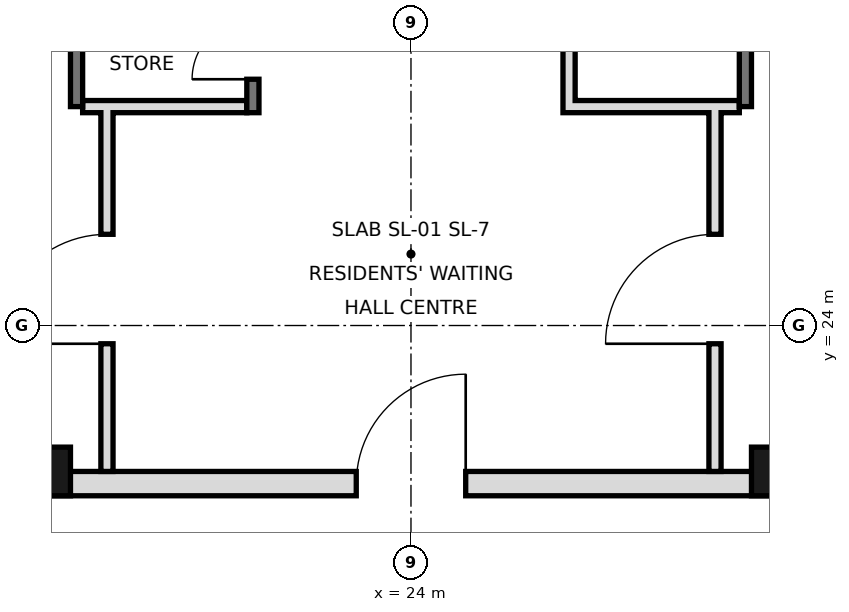
"""IFC4 building model, lengths in metres.
Left out: names, types, materials, properties, quantities, classifications, styles, units other than length and angle.
Written with IfcOpenShell. Run it as: python <this file> out.ifc"""

import sys

from ifc_helpers import new_model, si_unit, direction, frame, frame_2d, origin, origin_2d, place, context, subcontext, project, spatial, rectangle, hollow_rectangle, extrude, element, fill, save


model = new_model("IFC4")
c1 = context("Model", 3, precision=1e-05, world=origin(), true_north=direction((0.0, 1.0)))
c2 = subcontext(c1, "Body", "Model", "MODEL_VIEW")
j1 = project(units=[si_unit("LENGTHUNIT", "METRE"), si_unit("PLANEANGLEUNIT", "RADIAN")], contexts=[c1])
p1 = place(None, origin())
s1 = spatial("IfcSite", under=j1, at=p1, CompositionType="ELEMENT")
p2 = place(p1, origin())
s2 = spatial("IfcBuilding", under=s1, at=p2, CompositionType="ELEMENT")
p3 = place(p2, frame((0.0, 0.0, 305.2)))
s3 = spatial("IfcBuildingStorey", under=s2, at=p3, CompositionType="ELEMENT", Elevation=305.2)
for number, where, z_axis, x_axis in (
    (1, (18.0, 21.6, 0.0), (0.0, 0.0, 1.0), (1.0, 0.0, 0.0)),
    (2, (30.0, 21.6, 0.0), (0.0, 0.0, 1.0), (1.0, 0.0, 0.0)),
):
    element("IfcColumn", number, at=place(p3, frame(where, z_axis=z_axis, x_axis=x_axis)), inside=s3, PredefinedType="COLUMN", context=c2, shape_type="SweptSolid", body=[
        extrude(hollow_rectangle(XDim=0.8, YDim=0.8, WallThickness=0.025, at=origin_2d()), origin(), (0.0, 0.0, 1.0), 3.6),
    ])
for number, where, z_axis, x_axis in (
    (3, (18.5, 27.6, 0.0), (0.0, 0.0, 1.0), (0.0, 1.0, 0.0)),
    (4, (29.5, 27.6, 0.0), (0.0, 0.0, 1.0), (0.0, 1.0, 0.0)),
):
    element("IfcWall", number, at=place(p3, frame(where, z_axis=z_axis, x_axis=x_axis)), inside=s3, PredefinedType="SOLIDWALL", context=c2, shape_type="SweptSolid", body=[
        extrude(rectangle(XDim=17.5, YDim=0.2, at=frame_2d((8.75, 0.0))), origin(), (0.0, 0.0, 1.0), 3.42),
    ])
p4 = place(p3, frame((5.6, 21.4, 0.0), z_axis=(0.0, 0.0, 1.0), x_axis=(1.0, 0.0, 0.0)))
e5 = element("IfcWall", 5, at=p4, inside=s3, PredefinedType="SOLIDWALL", context=c2, shape_type="SweptSolid", body=[
    extrude(rectangle(XDim=36.8, YDim=0.4, at=frame_2d((18.4, 0.0))), origin(), (0.0, 0.0, 1.0), 3.42),
])
p5 = place(p4, frame((8.5, 0.0, 0.0)))
e6 = element("IfcOpeningElement", 6, at=p5, cuts=e5, PredefinedType="OPENING", context=c2, shape_type="SweptSolid", body=[
    extrude(rectangle(XDim=1.8, YDim=2.1, at=frame_2d((0.9, 1.05))), frame((0.0, 0.21, 0.0), z_axis=(0.0, -1.0, 0.0), x_axis=(1.0, 0.0, 0.0)), (0.0, 0.0, 1.0), 0.42),
])
p6 = place(p4, frame((17.5, 0.0, 0.0)))
e7 = element("IfcOpeningElement", 7, at=p6, cuts=e5, PredefinedType="OPENING", context=c2, shape_type="SweptSolid", body=[
    extrude(rectangle(XDim=1.8, YDim=2.1, at=frame_2d((0.9, 1.05))), frame((0.0, 0.21, 0.0), z_axis=(0.0, -1.0, 0.0), x_axis=(1.0, 0.0, 0.0)), (0.0, 0.0, 1.0), 0.42),
])
p7 = place(p4, frame((26.5, 0.0, 0.0)))
e8 = element("IfcOpeningElement", 8, at=p7, cuts=e5, PredefinedType="OPENING", context=c2, shape_type="SweptSolid", body=[
    extrude(rectangle(XDim=1.8, YDim=2.1, at=frame_2d((0.9, 1.05))), frame((0.0, 0.21, 0.0), z_axis=(0.0, -1.0, 0.0), x_axis=(1.0, 0.0, 0.0)), (0.0, 0.0, 1.0), 0.42),
])
p8 = place(p4, frame((4.5, 0.0, 0.0)))
e9 = element("IfcOpeningElement", 9, at=p8, cuts=e5, PredefinedType="OPENING", context=c2, shape_type="SweptSolid", body=[
    extrude(rectangle(XDim=1.2, YDim=2.1, at=frame_2d((0.6, 1.05))), frame((0.0, 0.21, 0.0), z_axis=(0.0, -1.0, 0.0), x_axis=(1.0, 0.0, 0.0)), (0.0, 0.0, 1.0), 0.42),
])
p9 = place(p4, frame((31.1, 0.0, 0.0)))
e10 = element("IfcOpeningElement", 10, at=p9, cuts=e5, PredefinedType="OPENING", context=c2, shape_type="SweptSolid", body=[
    extrude(rectangle(XDim=1.2, YDim=2.1, at=frame_2d((0.6, 1.05))), frame((0.0, 0.21, 0.0), z_axis=(0.0, -1.0, 0.0), x_axis=(1.0, 0.0, 0.0)), (0.0, 0.0, 1.0), 0.42),
])
p10 = place(p3, frame((19.0, 21.6, 0.0), z_axis=(0.0, 0.0, 1.0), x_axis=(0.0, 1.0, 0.0)))
e11 = element("IfcWall", 11, at=p10, inside=s3, PredefinedType="PARTITIONING", context=c2, shape_type="SweptSolid", body=[
    extrude(rectangle(XDim=6.0, YDim=0.2, at=frame_2d((3.0, 0.0))), origin(), (0.0, 0.0, 1.0), 3.42),
])
p11 = place(p10, frame((2.1, 0.0, 0.0)))
e12 = element("IfcOpeningElement", 12, at=p11, cuts=e11, PredefinedType="OPENING", context=c2, shape_type="SweptSolid", body=[
    extrude(rectangle(XDim=1.8, YDim=2.1, at=frame_2d((0.9, 1.05))), frame((0.0, 0.11, 0.0), z_axis=(0.0, -1.0, 0.0), x_axis=(1.0, 0.0, 0.0)), (0.0, 0.0, 1.0), 0.22),
])
p12 = place(p3, frame((29.0, 21.6, 0.0), z_axis=(0.0, 0.0, 1.0), x_axis=(0.0, 1.0, 0.0)))
e13 = element("IfcWall", 13, at=p12, inside=s3, PredefinedType="PARTITIONING", context=c2, shape_type="SweptSolid", body=[
    extrude(rectangle(XDim=6.0, YDim=0.2, at=frame_2d((3.0, 0.0))), origin(), (0.0, 0.0, 1.0), 3.42),
])
p13 = place(p12, frame((2.1, 0.0, 0.0)))
e14 = element("IfcOpeningElement", 14, at=p13, cuts=e13, PredefinedType="OPENING", context=c2, shape_type="SweptSolid", body=[
    extrude(rectangle(XDim=1.8, YDim=2.1, at=frame_2d((0.9, 1.05))), frame((0.0, 0.11, 0.0), z_axis=(0.0, -1.0, 0.0), x_axis=(1.0, 0.0, 0.0)), (0.0, 0.0, 1.0), 0.22),
])
p14 = place(p3, frame((21.4, 27.5, 0.0), z_axis=(0.0, 0.0, 1.0), x_axis=(0.0, 1.0, 0.0)))
e15 = element("IfcWall", 15, at=p14, inside=s3, PredefinedType="SOLIDWALL", context=c2, shape_type="SweptSolid", body=[
    extrude(rectangle(XDim=17.5, YDim=0.2, at=frame_2d((8.75, 0.0))), origin(), (0.0, 0.0, 1.0), 3.42),
])
p15 = place(p14, frame((0.55, 0.0, 0.0)))
e16 = element("IfcOpeningElement", 16, at=p15, cuts=e15, PredefinedType="OPENING", context=c2, shape_type="SweptSolid", body=[
    extrude(rectangle(XDim=1.0, YDim=2.1, at=frame_2d((0.5, 1.05))), frame((0.0, 0.11, 0.0), z_axis=(0.0, -1.0, 0.0), x_axis=(1.0, 0.0, 0.0)), (0.0, 0.0, 1.0), 0.22),
])
p16 = place(p14, frame((3.65, 0.0, 0.0)))
e17 = element("IfcOpeningElement", 17, at=p16, cuts=e15, PredefinedType="OPENING", context=c2, shape_type="SweptSolid", body=[
    extrude(rectangle(XDim=1.0, YDim=2.1, at=frame_2d((0.5, 1.05))), frame((0.0, 0.11, 0.0), z_axis=(0.0, -1.0, 0.0), x_axis=(1.0, 0.0, 0.0)), (0.0, 0.0, 1.0), 0.22),
])
p17 = place(p14, frame((16.2, 0.0, 0.0)))
e18 = element("IfcOpeningElement", 18, at=p17, cuts=e15, PredefinedType="OPENING", context=c2, shape_type="SweptSolid", body=[
    extrude(rectangle(XDim=1.0, YDim=2.1, at=frame_2d((0.5, 1.05))), frame((0.0, 0.11, 0.0), z_axis=(0.0, -1.0, 0.0), x_axis=(1.0, 0.0, 0.0)), (0.0, 0.0, 1.0), 0.22),
])
p18 = place(p14, frame((7.4, 0.0, 0.0)))
e19 = element("IfcOpeningElement", 19, at=p18, cuts=e15, PredefinedType="OPENING", context=c2, shape_type="SweptSolid", body=[
    extrude(rectangle(XDim=0.9, YDim=2.1, at=frame_2d((0.45, 1.05))), frame((0.0, 0.11, 0.0), z_axis=(0.0, -1.0, 0.0), x_axis=(1.0, 0.0, 0.0)), (0.0, 0.0, 1.0), 0.22),
])
p19 = place(p3, frame((26.6, 27.5, 0.0), z_axis=(0.0, 0.0, 1.0), x_axis=(0.0, 1.0, 0.0)))
e20 = element("IfcWall", 20, at=p19, inside=s3, PredefinedType="SOLIDWALL", context=c2, shape_type="SweptSolid", body=[
    extrude(rectangle(XDim=17.5, YDim=0.2, at=frame_2d((8.75, 0.0))), origin(), (0.0, 0.0, 1.0), 3.42),
])
p20 = place(p19, frame((4.3, 0.0, 0.0)))
e21 = element("IfcOpeningElement", 21, at=p20, cuts=e20, PredefinedType="OPENING", context=c2, shape_type="SweptSolid", body=[
    extrude(rectangle(XDim=0.9, YDim=2.1, at=frame_2d((0.45, 1.05))), frame((0.0, 0.11, 0.0), z_axis=(0.0, -1.0, 0.0), x_axis=(1.0, 0.0, 0.0)), (0.0, 0.0, 1.0), 0.22),
])
p21 = place(p19, frame((10.35, 0.0, 0.0)))
e22 = element("IfcOpeningElement", 22, at=p21, cuts=e20, PredefinedType="OPENING", context=c2, shape_type="SweptSolid", body=[
    extrude(rectangle(XDim=1.0, YDim=2.1, at=frame_2d((0.5, 1.05))), frame((0.0, 0.11, 0.0), z_axis=(0.0, -1.0, 0.0), x_axis=(1.0, 0.0, 0.0)), (0.0, 0.0, 1.0), 0.22),
])
p22 = place(p19, frame((15.475, 0.0, 0.0)))
e23 = element("IfcOpeningElement", 23, at=p22, cuts=e20, PredefinedType="OPENING", context=c2, shape_type="SweptSolid", body=[
    extrude(rectangle(XDim=1.0, YDim=2.1, at=frame_2d((0.5, 1.05))), frame((0.0, 0.11, 0.0), z_axis=(0.0, -1.0, 0.0), x_axis=(1.0, 0.0, 0.0)), (0.0, 0.0, 1.0), 0.22),
])
p23 = place(p3, frame((18.6, 27.6, 0.0), z_axis=(0.0, 0.0, 1.0), x_axis=(1.0, 0.0, 0.0)))
e24 = element("IfcWall", 24, at=p23, inside=s3, PredefinedType="PARTITIONING", context=c2, shape_type="SweptSolid", body=[
    extrude(rectangle(XDim=2.7, YDim=0.2, at=frame_2d((1.35, 0.0))), origin(), (0.0, 0.0, 1.0), 3.42),
])
p24 = place(p3, frame((26.7, 27.6, 0.0), z_axis=(0.0, 0.0, 1.0), x_axis=(1.0, 0.0, 0.0)))
e25 = element("IfcWall", 25, at=p24, inside=s3, PredefinedType="SOLIDWALL", context=c2, shape_type="SweptSolid", body=[
    extrude(rectangle(XDim=2.7, YDim=0.2, at=frame_2d((1.35, 0.0))), origin(), (0.0, 0.0, 1.0), 3.42),
])
p25 = place(p11, origin())
e26 = element("IfcDoor", 26, at=p25, inside=s3, OperationType="SINGLE_SWING_LEFT", PredefinedType="DOOR", context=c2, shape_type="SweptSolid", body=[
    extrude(rectangle(XDim=1.8, YDim=2.1, at=frame_2d((0.9, 1.05))), frame((0.0, 0.025, 0.0), z_axis=(0.0, -1.0, 0.0), x_axis=(1.0, 0.0, 0.0)), (0.0, 0.0, 1.0), 0.05),
])
fill(e12, e26)
p26 = place(p6, frame((1.8, 0.0, 0.0), z_axis=(0.0, 0.0, 1.0), x_axis=(-1.0, 0.0, 0.0)))
e27 = element("IfcDoor", 27, at=p26, inside=s3, OperationType="SINGLE_SWING_LEFT", PredefinedType="DOOR", context=c2, shape_type="SweptSolid", body=[
    extrude(rectangle(XDim=1.8, YDim=2.1, at=frame_2d((0.9, 1.05))), frame((0.0, 0.025, 0.0), z_axis=(0.0, -1.0, 0.0), x_axis=(1.0, 0.0, 0.0)), (0.0, 0.0, 1.0), 0.05),
])
fill(e7, e27)
p27 = place(p13, origin())
e28 = element("IfcDoor", 28, at=p27, inside=s3, OperationType="SINGLE_SWING_LEFT", PredefinedType="DOOR", context=c2, shape_type="SweptSolid", body=[
    extrude(rectangle(XDim=1.8, YDim=2.1, at=frame_2d((0.9, 1.05))), frame((0.0, 0.025, 0.0), z_axis=(0.0, -1.0, 0.0), x_axis=(1.0, 0.0, 0.0)), (0.0, 0.0, 1.0), 0.05),
])
fill(e14, e28)
p28 = place(p15, origin())
e29 = element("IfcDoor", 29, at=p28, inside=s3, OperationType="SINGLE_SWING_LEFT", PredefinedType="DOOR", context=c2, shape_type="SweptSolid", body=[
    extrude(rectangle(XDim=1.0, YDim=2.1, at=frame_2d((0.5, 1.05))), frame((0.0, 0.025, 0.0), z_axis=(0.0, -1.0, 0.0), x_axis=(1.0, 0.0, 0.0)), (0.0, 0.0, 1.0), 0.05),
])
fill(e16, e29)
save(model, sys.argv[1])
